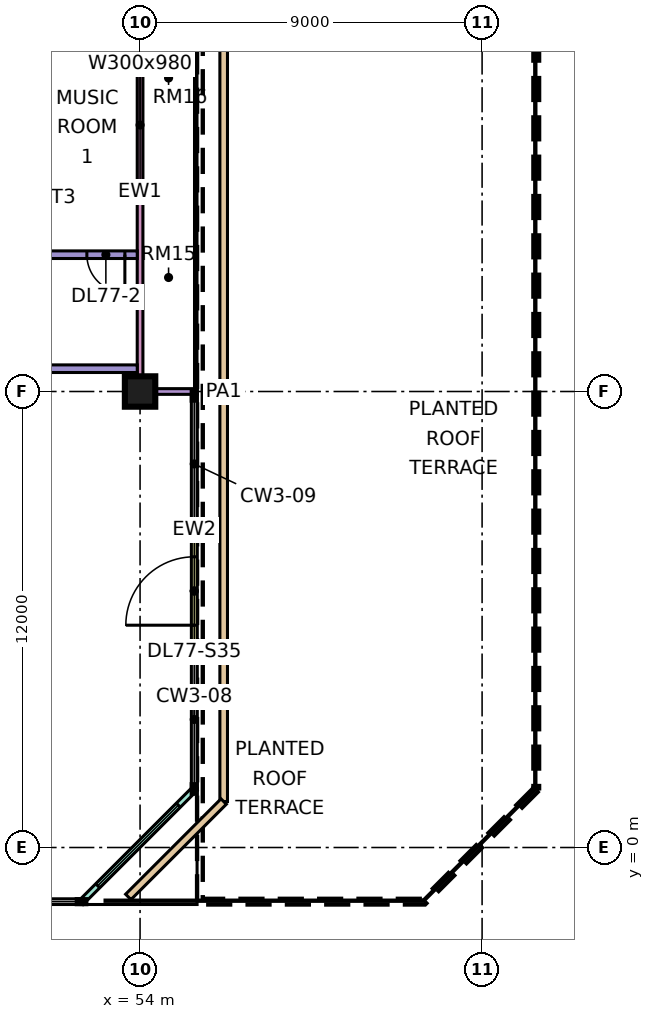
"""IFC4 building model, lengths in metres.
Left out: names, types, materials, properties, quantities, classifications, styles, units other than length and angle.
Written with IfcOpenShell. Run it as: python <this file> out.ifc"""

import sys

from ifc_helpers import new_model, si_unit, direction, frame, frame_2d, origin, origin_2d, place, context, subcontext, project, spatial, rectangle, extrude, element, fill, save


model = new_model("IFC4")
c1 = context("Model", 3, precision=1e-05, world=origin(), true_north=direction((0.0, 1.0)))
c2 = subcontext(c1, "Body", "Model", "MODEL_VIEW")
j1 = project(units=[si_unit("LENGTHUNIT", "METRE"), si_unit("PLANEANGLEUNIT", "RADIAN")], contexts=[c1])
p1 = place(None, origin())
s1 = spatial("IfcSite", under=j1, at=p1, CompositionType="ELEMENT")
p2 = place(p1, origin())
s2 = spatial("IfcBuilding", under=s1, at=p2, CompositionType="ELEMENT")
p3 = place(p2, frame((0.0, 0.0, 327.65)))
s3 = spatial("IfcBuildingStorey", under=s2, at=p3, CompositionType="ELEMENT", Elevation=327.65)
p4 = place(p3, frame((54.0, 12.0, 0.0), z_axis=(0.0, 0.0, 1.0), x_axis=(1.0, 0.0, 0.0)))
e1 = element("IfcColumn", 1, at=p4, inside=s3, PredefinedType="COLUMN", context=c2, shape_type="SweptSolid", body=[
    extrude(rectangle(XDim=0.8, YDim=0.8, at=origin_2d()), origin(), (0.0, 0.0, 1.0), 11.25),
])
p5 = place(p3, frame((52.447, -1.447, 0.0), z_axis=(0.0, 0.0, 1.0), x_axis=(0.707106781187, 0.707106781187, 0.0)))
e2 = element("IfcWall", 2, at=p5, inside=s3, PredefinedType="SOLIDWALL", context=c2, shape_type="SweptSolid", body=[
    extrude(rectangle(XDim=4.243, YDim=0.15, at=frame_2d((2.121, 0.0))), origin(), (0.0, 0.0, 1.0), 10.85),
])
p6 = place(p5, frame((0.621, 0.0, 0.45)))
e3 = element("IfcOpeningElement", 3, at=p6, cuts=e2, PredefinedType="OPENING", context=c2, shape_type="SweptSolid", body=[
    extrude(rectangle(XDim=3.0, YDim=9.8, at=frame_2d((1.5, 4.9))), frame((0.0, 0.085, 0.0), z_axis=(0.0, -1.0, 0.0), x_axis=(1.0, 0.0, 0.0)), (0.0, 0.0, 1.0), 0.17),
])
p7 = place(p3, frame((55.425, 5.25, 0.0), z_axis=(0.0, 0.0, 1.0), x_axis=(0.0, 1.0, 0.0)))
e4 = element("IfcWall", 4, at=p7, inside=s3, PredefinedType="SOLIDWALL", context=c2, shape_type="SweptSolid", body=[
    extrude(rectangle(XDim=3.0, YDim=0.15, at=frame_2d((1.5, 0.0))), origin(), (0.0, 0.0, 1.0), 10.85),
])
p8 = place(p7, frame((0.6, 0.0, 0.0)))
e5 = element("IfcOpeningElement", 5, at=p8, cuts=e4, PredefinedType="OPENING", context=c2, shape_type="SweptSolid", body=[
    extrude(rectangle(XDim=1.8, YDim=2.4, at=frame_2d((0.9, 1.2))), frame((0.0, 0.085, 0.0), z_axis=(0.0, -1.0, 0.0), x_axis=(1.0, 0.0, 0.0)), (0.0, 0.0, 1.0), 0.17),
])
p9 = place(p3, frame((54.0, 12.075, 0.0), z_axis=(0.0, 0.0, 1.0), x_axis=(0.0, 1.0, 0.0)))
e6 = element("IfcWall", 6, at=p9, inside=s3, PredefinedType="SOLIDWALL", context=c2, shape_type="SweptSolid", body=[
    extrude(rectangle(XDim=10.35, YDim=0.15, at=frame_2d((5.175, 0.0))), origin(), (0.0, 0.0, 1.0), 10.85),
])
p10 = place(p9, frame((5.438, 0.0, 0.45)))
e7 = element("IfcOpeningElement", 7, at=p10, cuts=e6, PredefinedType="OPENING", context=c2, shape_type="SweptSolid", body=[
    extrude(rectangle(XDim=3.0, YDim=9.8, at=frame_2d((1.5, 4.9))), frame((0.0, 0.085, 0.0), z_axis=(0.0, -1.0, 0.0), x_axis=(1.0, 0.0, 0.0)), (0.0, 0.0, 1.0), 0.17),
])
p11 = place(p3, frame((55.5, 12.0, 0.0), z_axis=(0.0, 0.0, 1.0), x_axis=(-1.0, 0.0, 0.0)))
e8 = element("IfcWall", 8, at=p11, inside=s3, PredefinedType="SOLIDWALL", context=c2, shape_type="SweptSolid", body=[
    extrude(rectangle(XDim=1.5, YDim=0.15, at=frame_2d((0.75, 0.0))), origin(), (0.0, 0.0, 1.0), 10.85),
])
p12 = place(p3, frame((56.2, 22.79, 0.0), z_axis=(0.0, 0.0, 1.0), x_axis=(0.0, -1.0, 0.0)))
e9 = element("IfcWall", 9, at=p12, inside=s3, PredefinedType="PARAPET", context=c2, shape_type="SweptSolid", body=[
    extrude(rectangle(XDim=21.58, YDim=0.2, at=frame_2d((10.79, 0.0))), origin(), (0.0, 0.0, 1.0), 0.5),
])
p13 = place(p3, frame((56.2, 1.21, 0.0), z_axis=(0.0, 0.0, 1.0), x_axis=(-0.707106781187, -0.707106781187, 0.0)))
e10 = element("IfcWall", 10, at=p13, inside=s3, PredefinedType="PARAPET", context=c2, shape_type="SweptSolid", body=[
    extrude(rectangle(XDim=3.55, YDim=0.2, at=frame_2d((1.775, 0.0))), origin(), (0.0, 0.0, 1.0), 0.5),
])
p14 = place(p3, frame((40.65, 12.6, 0.0), z_axis=(0.0, 0.0, 1.0), x_axis=(1.0, 0.0, 0.0)))
e11 = element("IfcWall", 11, at=p14, inside=s3, PredefinedType="PARTITIONING", context=c2, shape_type="SweptSolid", body=[
    extrude(rectangle(XDim=13.276, YDim=0.2, at=frame_2d((6.638, 0.0))), origin(), (0.0, 0.0, 1.0), 10.85),
])
p15 = place(p14, frame((1.65, 0.0, 0.0)))
e12 = element("IfcOpeningElement", 12, at=p15, cuts=e11, PredefinedType="OPENING", context=c2, shape_type="SweptSolid", body=[
    extrude(rectangle(XDim=1.0, YDim=2.1, at=frame_2d((0.5, 1.05))), frame((0.0, 0.11, 0.0), z_axis=(0.0, -1.0, 0.0), x_axis=(1.0, 0.0, 0.0)), (0.0, 0.0, 1.0), 0.22),
])
p16 = place(p14, frame((0.15, 0.0, 0.0)))
e13 = element("IfcOpeningElement", 13, at=p16, cuts=e11, PredefinedType="OPENING", context=c2, shape_type="SweptSolid", body=[
    extrude(rectangle(XDim=1.0, YDim=2.1, at=frame_2d((0.5, 1.05))), frame((0.0, 0.11, 0.0), z_axis=(0.0, -1.0, 0.0), x_axis=(1.0, 0.0, 0.0)), (0.0, 0.0, 1.0), 0.22),
])
p17 = place(p14, frame((8.25, 0.0, 0.0)))
e14 = element("IfcOpeningElement", 14, at=p17, cuts=e11, PredefinedType="OPENING", context=c2, shape_type="SweptSolid", body=[
    extrude(rectangle(XDim=1.0, YDim=2.1, at=frame_2d((0.5, 1.05))), frame((0.0, 0.11, 0.0), z_axis=(0.0, -1.0, 0.0), x_axis=(1.0, 0.0, 0.0)), (0.0, 0.0, 1.0), 0.22),
])
p18 = place(p14, frame((5.0, 0.0, 0.0)))
e15 = element("IfcOpeningElement", 15, at=p18, cuts=e11, PredefinedType="OPENING", context=c2, shape_type="SweptSolid", body=[
    extrude(rectangle(XDim=1.0, YDim=2.1, at=frame_2d((0.5, 1.05))), frame((0.0, 0.11, 0.0), z_axis=(0.0, -1.0, 0.0), x_axis=(1.0, 0.0, 0.0)), (0.0, 0.0, 1.0), 0.22),
])
p19 = place(p3, frame((51.225, 15.6, 0.0), z_axis=(0.0, 0.0, 1.0), x_axis=(1.0, 0.0, 0.0)))
e16 = element("IfcWall", 16, at=p19, inside=s3, PredefinedType="PARTITIONING", context=c2, shape_type="SweptSolid", body=[
    extrude(rectangle(XDim=2.701, YDim=0.2, at=frame_2d((1.351, 0.0))), origin(), (0.0, 0.0, 1.0), 10.85),
])
p20 = place(p19, frame((1.375, 0.0, 0.0)))
e17 = element("IfcOpeningElement", 17, at=p20, cuts=e16, PredefinedType="OPENING", context=c2, shape_type="SweptSolid", body=[
    extrude(rectangle(XDim=1.0, YDim=2.1, at=frame_2d((0.5, 1.05))), frame((0.0, 0.11, 0.0), z_axis=(0.0, -1.0, 0.0), x_axis=(1.0, 0.0, 0.0)), (0.0, 0.0, 1.0), 0.22),
])
p21 = place(p6, origin())
e18 = element("IfcWindow", 18, at=p21, inside=s3, PartitioningType="SINGLE_PANEL", PredefinedType="WINDOW", context=c2, shape_type="SweptSolid", body=[
    extrude(rectangle(XDim=3.0, YDim=9.8, at=frame_2d((1.5, 4.9))), frame((0.0, 0.03, 0.0), z_axis=(0.0, -1.0, 0.0), x_axis=(1.0, 0.0, 0.0)), (0.0, 0.0, 1.0), 0.06),
])
fill(e3, e18)
p22 = place(p8, origin())
e19 = element("IfcDoor", 19, at=p22, inside=s3, OperationType="DOUBLE_DOOR_SINGLE_SWING", PredefinedType="DOOR", context=c2, shape_type="SweptSolid", body=[
    extrude(rectangle(XDim=1.8, YDim=2.4, at=frame_2d((0.9, 1.2))), frame((0.0, 0.025, 0.0), z_axis=(0.0, -1.0, 0.0), x_axis=(1.0, 0.0, 0.0)), (0.0, 0.0, 1.0), 0.05),
])
fill(e5, e19)
p23 = place(p10, origin())
e20 = element("IfcWindow", 20, at=p23, inside=s3, PartitioningType="SINGLE_PANEL", PredefinedType="WINDOW", context=c2, shape_type="SweptSolid", body=[
    extrude(rectangle(XDim=3.0, YDim=9.8, at=frame_2d((1.5, 4.9))), frame((0.0, 0.03, 0.0), z_axis=(0.0, -1.0, 0.0), x_axis=(1.0, 0.0, 0.0)), (0.0, 0.0, 1.0), 0.06),
])
fill(e7, e20)
p24 = place(p20, origin())
e21 = element("IfcDoor", 21, at=p24, inside=s3, OperationType="SINGLE_SWING_RIGHT", PredefinedType="DOOR", context=c2, shape_type="SweptSolid", body=[
    extrude(rectangle(XDim=1.0, YDim=2.1, at=frame_2d((0.5, 1.05))), frame((0.0, 0.025, 0.0), z_axis=(0.0, -1.0, 0.0), x_axis=(1.0, 0.0, 0.0)), (0.0, 0.0, 1.0), 0.05),
])
fill(e17, e21)
save(model, sys.argv[1])
